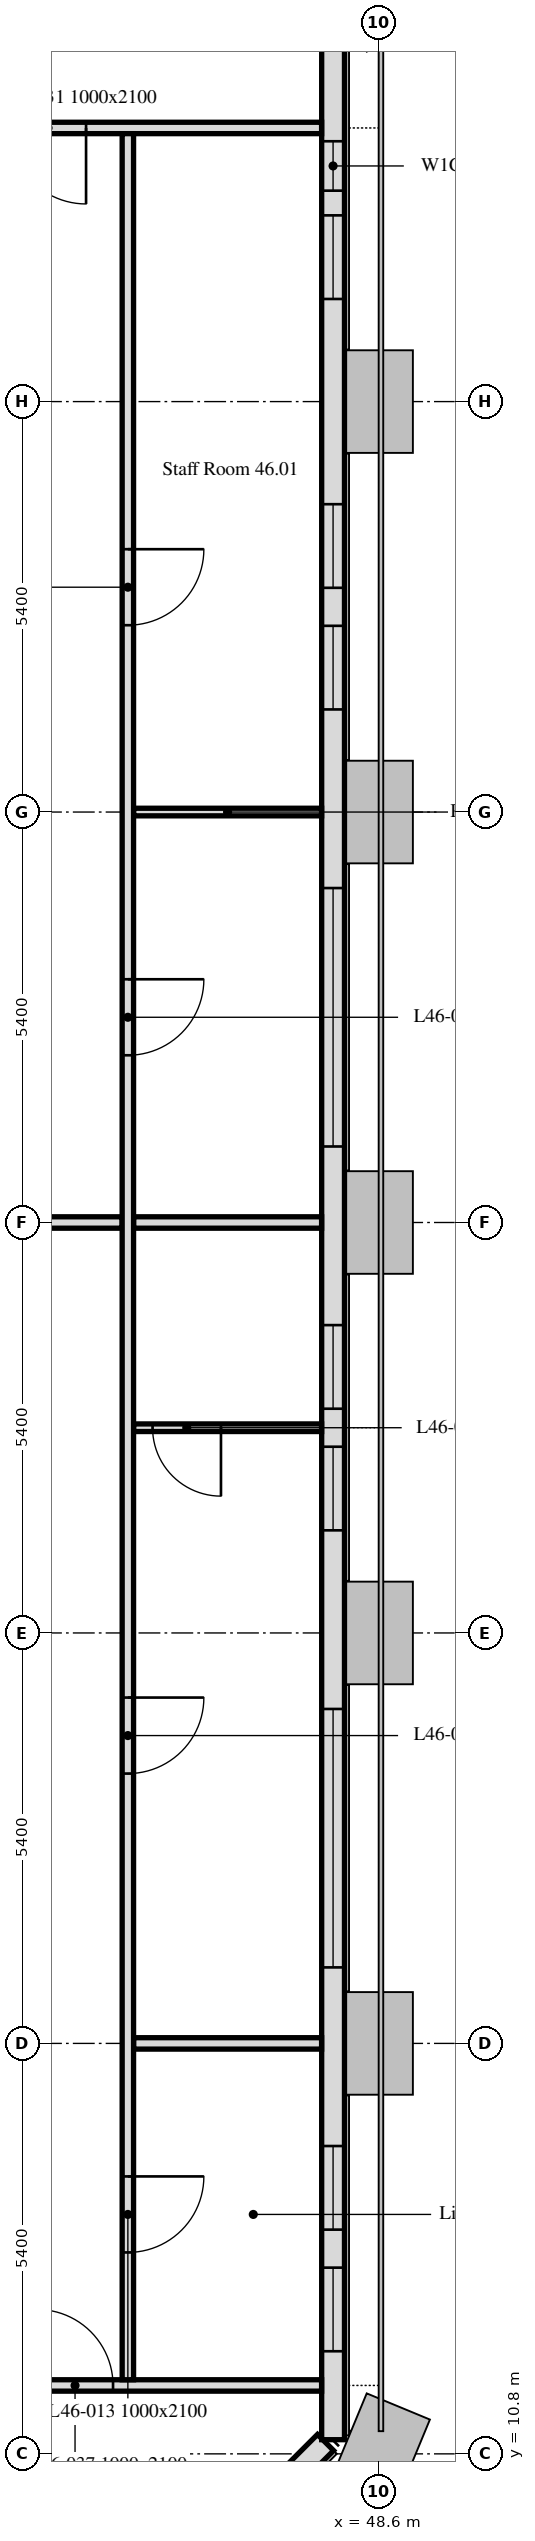
"""IFC4 building model, lengths in metres.
Left out: names, types, materials, properties, quantities, classifications, styles, units other than length and angle.
Written with IfcOpenShell. Run it as: python <this file> out.ifc"""

import sys

from ifc_helpers import new_model, si_unit, direction, frame, frame_2d, origin, place, context, subcontext, project, spatial, rectangle, extrude, element, fill, save


model = new_model("IFC4")
c1 = context("Model", 3, precision=1e-05, world=origin(), true_north=direction((0.0, 1.0)))
c2 = subcontext(c1, "Body", "Model", "MODEL_VIEW")
j1 = project(units=[si_unit("LENGTHUNIT", "METRE"), si_unit("PLANEANGLEUNIT", "RADIAN")], contexts=[c1])
p1 = place(None, origin())
s1 = spatial("IfcSite", under=j1, at=p1, CompositionType="ELEMENT")
p2 = place(p1, origin())
s2 = spatial("IfcBuilding", under=s1, at=p2, CompositionType="ELEMENT")
p3 = place(p2, frame((0.0, 0.0, 190.6)))
s3 = spatial("IfcBuildingStorey", under=s2, at=p3, CompositionType="ELEMENT", Elevation=190.6)
p4 = place(p3, frame((43.051, 6.099, 0.0), z_axis=(0.0, 0.0, 1.0), x_axis=(0.707106781187, 0.707106781187, 0.0)))
e1 = element("IfcWall", 1, at=p4, inside=s3, PredefinedType="SOLIDWALL", context=c2, shape_type="SweptSolid", body=[
    extrude(rectangle(XDim=6.86, YDim=0.3, at=frame_2d((3.43, 0.0))), origin(), (0.0, 0.0, 1.0), 3.0),
])
p5 = place(p4, frame((1.28, 0.0, 0.9)))
e2 = element("IfcOpeningElement", 2, at=p5, cuts=e1, PredefinedType="OPENING", context=c2, shape_type="SweptSolid", body=[
    extrude(rectangle(XDim=1.1, YDim=1.7, at=frame_2d((0.55, 0.85))), frame((0.0, 0.16, 0.0), z_axis=(0.0, -1.0, 0.0), x_axis=(1.0, 0.0, 0.0)), (0.0, 0.0, 1.0), 0.32),
])
p6 = place(p4, frame((4.48, 0.0, 0.9)))
e3 = element("IfcOpeningElement", 3, at=p6, cuts=e1, PredefinedType="OPENING", context=c2, shape_type="SweptSolid", body=[
    extrude(rectangle(XDim=1.1, YDim=1.7, at=frame_2d((0.55, 0.85))), frame((0.0, 0.16, 0.0), z_axis=(0.0, -1.0, 0.0), x_axis=(1.0, 0.0, 0.0)), (0.0, 0.0, 1.0), 0.32),
])
p7 = place(p3, frame((48.0, 10.986, 0.0), z_axis=(0.0, 0.0, 1.0), x_axis=(0.0, 1.0, 0.0)))
e4 = element("IfcWall", 4, at=p7, inside=s3, PredefinedType="SOLIDWALL", context=c2, shape_type="SweptSolid", body=[
    extrude(rectangle(XDim=32.027, YDim=0.3, at=frame_2d((16.014, 0.0))), origin(), (0.0, 0.0, 1.0), 3.0),
])
p8 = place(p7, frame((1.164, 0.0, 0.9)))
e5 = element("IfcOpeningElement", 5, at=p8, cuts=e4, PredefinedType="OPENING", context=c2, shape_type="SweptSolid", body=[
    extrude(rectangle(XDim=1.1, YDim=1.7, at=frame_2d((0.55, 0.85))), frame((0.0, 0.16, 0.0), z_axis=(0.0, -1.0, 0.0), x_axis=(1.0, 0.0, 0.0)), (0.0, 0.0, 1.0), 0.32),
])
p9 = place(p7, frame((2.764, 0.0, 0.9)))
e6 = element("IfcOpeningElement", 6, at=p9, cuts=e4, PredefinedType="OPENING", context=c2, shape_type="SweptSolid", body=[
    extrude(rectangle(XDim=1.1, YDim=1.7, at=frame_2d((0.55, 0.85))), frame((0.0, 0.16, 0.0), z_axis=(0.0, -1.0, 0.0), x_axis=(1.0, 0.0, 0.0)), (0.0, 0.0, 1.0), 0.32),
])
p10 = place(p7, frame((6.214, 0.0, 0.9)))
e7 = element("IfcOpeningElement", 7, at=p10, cuts=e4, PredefinedType="OPENING", context=c2, shape_type="SweptSolid", body=[
    extrude(rectangle(XDim=3.4, YDim=1.7, at=frame_2d((1.7, 0.85))), frame((0.0, 0.16, 0.0), z_axis=(0.0, -1.0, 0.0), x_axis=(1.0, 0.0, 0.0)), (0.0, 0.0, 1.0), 0.32),
])
p11 = place(p7, frame((11.964, 0.0, 0.9)))
e8 = element("IfcOpeningElement", 8, at=p11, cuts=e4, PredefinedType="OPENING", context=c2, shape_type="SweptSolid", body=[
    extrude(rectangle(XDim=1.1, YDim=1.7, at=frame_2d((0.55, 0.85))), frame((0.0, 0.16, 0.0), z_axis=(0.0, -1.0, 0.0), x_axis=(1.0, 0.0, 0.0)), (0.0, 0.0, 1.0), 0.32),
])
p12 = place(p7, frame((13.564, 0.0, 0.9)))
e9 = element("IfcOpeningElement", 9, at=p12, cuts=e4, PredefinedType="OPENING", context=c2, shape_type="SweptSolid", body=[
    extrude(rectangle(XDim=1.1, YDim=1.7, at=frame_2d((0.55, 0.85))), frame((0.0, 0.16, 0.0), z_axis=(0.0, -1.0, 0.0), x_axis=(1.0, 0.0, 0.0)), (0.0, 0.0, 1.0), 0.32),
])
p13 = place(p7, frame((17.014, 0.0, 0.9)))
e10 = element("IfcOpeningElement", 10, at=p13, cuts=e4, PredefinedType="OPENING", context=c2, shape_type="SweptSolid", body=[
    extrude(rectangle(XDim=3.4, YDim=1.7, at=frame_2d((1.7, 0.85))), frame((0.0, 0.16, 0.0), z_axis=(0.0, -1.0, 0.0), x_axis=(1.0, 0.0, 0.0)), (0.0, 0.0, 1.0), 0.32),
])
p14 = place(p7, frame((22.764, 0.0, 0.9)))
e11 = element("IfcOpeningElement", 11, at=p14, cuts=e4, PredefinedType="OPENING", context=c2, shape_type="SweptSolid", body=[
    extrude(rectangle(XDim=1.1, YDim=1.7, at=frame_2d((0.55, 0.85))), frame((0.0, 0.16, 0.0), z_axis=(0.0, -1.0, 0.0), x_axis=(1.0, 0.0, 0.0)), (0.0, 0.0, 1.0), 0.32),
])
p15 = place(p7, frame((24.364, 0.0, 0.9)))
e12 = element("IfcOpeningElement", 12, at=p15, cuts=e4, PredefinedType="OPENING", context=c2, shape_type="SweptSolid", body=[
    extrude(rectangle(XDim=1.1, YDim=1.7, at=frame_2d((0.55, 0.85))), frame((0.0, 0.16, 0.0), z_axis=(0.0, -1.0, 0.0), x_axis=(1.0, 0.0, 0.0)), (0.0, 0.0, 1.0), 0.32),
])
p16 = place(p7, frame((28.164, 0.0, 0.9)))
e13 = element("IfcOpeningElement", 13, at=p16, cuts=e4, PredefinedType="OPENING", context=c2, shape_type="SweptSolid", body=[
    extrude(rectangle(XDim=1.1, YDim=1.7, at=frame_2d((0.55, 0.85))), frame((0.0, 0.16, 0.0), z_axis=(0.0, -1.0, 0.0), x_axis=(1.0, 0.0, 0.0)), (0.0, 0.0, 1.0), 0.32),
])
p17 = place(p7, frame((29.589, 0.0, 0.9)))
e14 = element("IfcOpeningElement", 14, at=p17, cuts=e4, PredefinedType="OPENING", context=c2, shape_type="SweptSolid", body=[
    extrude(rectangle(XDim=0.65, YDim=1.7, at=frame_2d((0.325, 0.85))), frame((0.0, 0.16, 0.0), z_axis=(0.0, -1.0, 0.0), x_axis=(1.0, 0.0, 0.0)), (0.0, 0.0, 1.0), 0.32),
])
p18 = place(p3, frame((45.375, 32.4, 0.0), z_axis=(0.0, 0.0, 1.0), x_axis=(1.0, 0.0, 0.0)))
e15 = element("IfcWall", 15, at=p18, inside=s3, PredefinedType="PARTITIONING", context=c2, shape_type="SweptSolid", body=[
    extrude(rectangle(XDim=2.474, YDim=0.1, at=frame_2d((1.237, 0.0))), origin(), (0.0, 0.0, 1.0), 2.4),
])
p19 = place(p3, frame((47.849, 41.4, 0.0), z_axis=(0.0, 0.0, 1.0), x_axis=(-1.0, 0.0, 0.0)))
e16 = element("IfcWall", 16, at=p19, inside=s3, PredefinedType="PARTITIONING", context=c2, shape_type="SweptSolid", body=[
    extrude(rectangle(XDim=41.698, YDim=0.15, at=frame_2d((20.849, 0.0))), origin(), (0.0, 0.0, 1.0), 2.4),
])
p20 = place(p19, frame((39.249, 0.0, 0.0)))
e17 = element("IfcOpeningElement", 17, at=p20, cuts=e16, PredefinedType="OPENING", context=c2, shape_type="SweptSolid", body=[
    extrude(rectangle(XDim=1.0, YDim=2.1, at=frame_2d((0.5, 1.05))), frame((0.0, 0.075, 0.0), z_axis=(0.0, -1.0, 0.0), x_axis=(1.0, 0.0, 0.0)), (0.0, 0.0, 1.0), 0.15),
])
p21 = place(p19, frame((11.449, 0.0, 0.0)))
e18 = element("IfcOpeningElement", 18, at=p21, cuts=e16, PredefinedType="OPENING", context=c2, shape_type="SweptSolid", body=[
    extrude(rectangle(XDim=1.0, YDim=2.1, at=frame_2d((0.5, 1.05))), frame((0.0, 0.075, 0.0), z_axis=(0.0, -1.0, 0.0), x_axis=(1.0, 0.0, 0.0)), (0.0, 0.0, 1.0), 0.15),
])
p22 = place(p19, frame((3.099, 0.0, 0.0)))
e19 = element("IfcOpeningElement", 19, at=p22, cuts=e16, PredefinedType="OPENING", context=c2, shape_type="SweptSolid", body=[
    extrude(rectangle(XDim=1.0, YDim=2.1, at=frame_2d((0.5, 1.05))), frame((0.0, 0.075, 0.0), z_axis=(0.0, -1.0, 0.0), x_axis=(1.0, 0.0, 0.0)), (0.0, 0.0, 1.0), 0.15),
])
p23 = place(p19, frame((23.049, 0.0, 0.0)))
e20 = element("IfcOpeningElement", 20, at=p23, cuts=e16, PredefinedType="OPENING", context=c2, shape_type="SweptSolid", body=[
    extrude(rectangle(XDim=1.0, YDim=2.1, at=frame_2d((0.5, 1.05))), frame((0.0, 0.075, 0.0), z_axis=(0.0, -1.0, 0.0), x_axis=(1.0, 0.0, 0.0)), (0.0, 0.0, 1.0), 0.15),
])
p24 = place(p3, frame((45.375, 27.0, 0.0), z_axis=(0.0, 0.0, 1.0), x_axis=(1.0, 0.0, 0.0)))
e21 = element("IfcWall", 21, at=p24, inside=s3, PredefinedType="PARTITIONING", context=c2, shape_type="SweptSolid", body=[
    extrude(rectangle(XDim=2.474, YDim=0.15, at=frame_2d((1.237, 0.0))), origin(), (0.0, 0.0, 1.0), 2.4),
])
p25 = place(p3, frame((43.2, 27.0, 0.0), z_axis=(0.0, 0.0, 1.0), x_axis=(1.0, 0.0, 0.0)))
e22 = element("IfcWall", 22, at=p25, inside=s3, PredefinedType="PARTITIONING", context=c2, shape_type="SweptSolid", body=[
    extrude(rectangle(XDim=2.025, YDim=0.15, at=frame_2d((1.013, 0.0))), origin(), (0.0, 0.0, 1.0), 2.4),
])
p26 = place(p3, frame((47.849, 16.2, 0.0), z_axis=(0.0, 0.0, 1.0), x_axis=(-1.0, 0.0, 0.0)))
e23 = element("IfcWall", 23, at=p26, inside=s3, PredefinedType="PARTITIONING", context=c2, shape_type="SweptSolid", body=[
    extrude(rectangle(XDim=2.474, YDim=0.15, at=frame_2d((1.237, 0.0))), origin(), (0.0, 0.0, 1.0), 2.4),
])
p27 = place(p3, frame((6.151, 11.7, 0.0), z_axis=(0.0, 0.0, 1.0), x_axis=(1.0, 0.0, 0.0)))
e24 = element("IfcWall", 24, at=p27, inside=s3, PredefinedType="PARTITIONING", context=c2, shape_type="SweptSolid", body=[
    extrude(rectangle(XDim=41.698, YDim=0.15, at=frame_2d((20.849, 0.0))), origin(), (0.0, 0.0, 1.0), 3.0),
])
p28 = place(p27, frame((17.649, 0.0, 0.0)))
e25 = element("IfcOpeningElement", 25, at=p28, cuts=e24, PredefinedType="OPENING", context=c2, shape_type="SweptSolid", body=[
    extrude(rectangle(XDim=1.0, YDim=2.1, at=frame_2d((0.5, 1.05))), frame((0.0, 0.075, 0.0), z_axis=(0.0, -1.0, 0.0), x_axis=(1.0, 0.0, 0.0)), (0.0, 0.0, 1.0), 0.15),
])
p29 = place(p27, frame((1.449, 0.0, 0.0)))
e26 = element("IfcOpeningElement", 26, at=p29, cuts=e24, PredefinedType="OPENING", context=c2, shape_type="SweptSolid", body=[
    extrude(rectangle(XDim=1.0, YDim=2.1, at=frame_2d((0.5, 1.05))), frame((0.0, 0.075, 0.0), z_axis=(0.0, -1.0, 0.0), x_axis=(1.0, 0.0, 0.0)), (0.0, 0.0, 1.0), 0.15),
])
p30 = place(p27, frame((29.249, 0.0, 0.0)))
e27 = element("IfcOpeningElement", 27, at=p30, cuts=e24, PredefinedType="OPENING", context=c2, shape_type="SweptSolid", body=[
    extrude(rectangle(XDim=1.0, YDim=2.1, at=frame_2d((0.5, 1.05))), frame((0.0, 0.075, 0.0), z_axis=(0.0, -1.0, 0.0), x_axis=(1.0, 0.0, 0.0)), (0.0, 0.0, 1.0), 0.15),
])
p31 = place(p27, frame((37.954, 0.0, 0.0)))
e28 = element("IfcOpeningElement", 28, at=p31, cuts=e24, PredefinedType="OPENING", context=c2, shape_type="SweptSolid", body=[
    extrude(rectangle(XDim=1.0, YDim=2.1, at=frame_2d((0.5, 1.05))), frame((0.0, 0.075, 0.0), z_axis=(0.0, -1.0, 0.0), x_axis=(1.0, 0.0, 0.0)), (0.0, 0.0, 1.0), 0.15),
])
p32 = place(p3, frame((47.849, 24.3, 0.0), z_axis=(0.0, 0.0, 1.0), x_axis=(-1.0, 0.0, 0.0)))
e29 = element("IfcWall", 29, at=p32, inside=s3, PredefinedType="PARTITIONING", context=c2, shape_type="SweptSolid", body=[
    extrude(rectangle(XDim=2.474, YDim=0.1, at=frame_2d((1.237, 0.0))), origin(), (0.0, 0.0, 1.0), 3.0),
])
p33 = place(p32, frame((1.324, 0.0, 0.0)))
e30 = element("IfcOpeningElement", 30, at=p33, cuts=e29, PredefinedType="OPENING", context=c2, shape_type="SweptSolid", body=[
    extrude(rectangle(XDim=0.9, YDim=2.1, at=frame_2d((0.45, 1.05))), frame((0.0, 0.05, 0.0), z_axis=(0.0, -1.0, 0.0), x_axis=(1.0, 0.0, 0.0)), (0.0, 0.0, 1.0), 0.1),
])
p34 = place(p3, frame((45.3, 41.325, 0.0), z_axis=(0.0, 0.0, 1.0), x_axis=(0.0, -1.0, 0.0)))
e31 = element("IfcWall", 31, at=p34, inside=s3, PredefinedType="PARTITIONING", context=c2, shape_type="SweptSolid", body=[
    extrude(rectangle(XDim=29.55, YDim=0.15, at=frame_2d((14.775, 0.0))), origin(), (0.0, 0.0, 1.0), 2.4),
])
p35 = place(p34, frame((5.467, 0.0, 0.0)))
e32 = element("IfcOpeningElement", 32, at=p35, cuts=e31, PredefinedType="OPENING", context=c2, shape_type="SweptSolid", body=[
    extrude(rectangle(XDim=1.0, YDim=2.1, at=frame_2d((0.5, 1.05))), frame((0.0, 0.075, 0.0), z_axis=(0.0, -1.0, 0.0), x_axis=(1.0, 0.0, 0.0)), (0.0, 0.0, 1.0), 0.15),
])
p36 = place(p34, frame((11.125, 0.0, 0.0)))
e33 = element("IfcOpeningElement", 33, at=p36, cuts=e31, PredefinedType="OPENING", context=c2, shape_type="SweptSolid", body=[
    extrude(rectangle(XDim=1.0, YDim=2.1, at=frame_2d((0.5, 1.05))), frame((0.0, 0.075, 0.0), z_axis=(0.0, -1.0, 0.0), x_axis=(1.0, 0.0, 0.0)), (0.0, 0.0, 1.0), 0.15),
])
p37 = place(p34, frame((26.875, 0.0, 0.0)))
e34 = element("IfcOpeningElement", 34, at=p37, cuts=e31, PredefinedType="OPENING", context=c2, shape_type="SweptSolid", body=[
    extrude(rectangle(XDim=1.0, YDim=2.1, at=frame_2d((0.5, 1.05))), frame((0.0, 0.075, 0.0), z_axis=(0.0, -1.0, 0.0), x_axis=(1.0, 0.0, 0.0)), (0.0, 0.0, 1.0), 0.15),
])
p38 = place(p34, frame((20.575, 0.0, 0.0)))
e35 = element("IfcOpeningElement", 35, at=p38, cuts=e31, PredefinedType="OPENING", context=c2, shape_type="SweptSolid", body=[
    extrude(rectangle(XDim=1.0, YDim=2.1, at=frame_2d((0.5, 1.05))), frame((0.0, 0.075, 0.0), z_axis=(0.0, -1.0, 0.0), x_axis=(1.0, 0.0, 0.0)), (0.0, 0.0, 1.0), 0.15),
])
p39 = place(p8, origin())
e36 = element("IfcWindow", 36, at=p39, inside=s3, PartitioningType="SINGLE_PANEL", PredefinedType="WINDOW", context=c2, shape_type="SweptSolid", body=[
    extrude(rectangle(XDim=1.1, YDim=1.7, at=frame_2d((0.55, 0.85))), frame((0.0, 0.03, 0.0), z_axis=(0.0, -1.0, 0.0), x_axis=(1.0, 0.0, 0.0)), (0.0, 0.0, 1.0), 0.06),
])
fill(e5, e36)
p40 = place(p9, origin())
e37 = element("IfcWindow", 37, at=p40, inside=s3, PartitioningType="SINGLE_PANEL", PredefinedType="WINDOW", context=c2, shape_type="SweptSolid", body=[
    extrude(rectangle(XDim=1.1, YDim=1.7, at=frame_2d((0.55, 0.85))), frame((0.0, 0.03, 0.0), z_axis=(0.0, -1.0, 0.0), x_axis=(1.0, 0.0, 0.0)), (0.0, 0.0, 1.0), 0.06),
])
fill(e6, e37)
p41 = place(p10, origin())
e38 = element("IfcWindow", 38, at=p41, inside=s3, PartitioningType="SINGLE_PANEL", PredefinedType="WINDOW", context=c2, shape_type="SweptSolid", body=[
    extrude(rectangle(XDim=3.4, YDim=1.7, at=frame_2d((1.7, 0.85))), frame((0.0, 0.03, 0.0), z_axis=(0.0, -1.0, 0.0), x_axis=(1.0, 0.0, 0.0)), (0.0, 0.0, 1.0), 0.06),
])
fill(e7, e38)
p42 = place(p11, origin())
e39 = element("IfcWindow", 39, at=p42, inside=s3, PartitioningType="SINGLE_PANEL", PredefinedType="WINDOW", context=c2, shape_type="SweptSolid", body=[
    extrude(rectangle(XDim=1.1, YDim=1.7, at=frame_2d((0.55, 0.85))), frame((0.0, 0.03, 0.0), z_axis=(0.0, -1.0, 0.0), x_axis=(1.0, 0.0, 0.0)), (0.0, 0.0, 1.0), 0.06),
])
fill(e8, e39)
p43 = place(p12, origin())
e40 = element("IfcWindow", 40, at=p43, inside=s3, PartitioningType="SINGLE_PANEL", PredefinedType="WINDOW", context=c2, shape_type="SweptSolid", body=[
    extrude(rectangle(XDim=1.1, YDim=1.7, at=frame_2d((0.55, 0.85))), frame((0.0, 0.03, 0.0), z_axis=(0.0, -1.0, 0.0), x_axis=(1.0, 0.0, 0.0)), (0.0, 0.0, 1.0), 0.06),
])
fill(e9, e40)
p44 = place(p13, origin())
e41 = element("IfcWindow", 41, at=p44, inside=s3, PartitioningType="SINGLE_PANEL", PredefinedType="WINDOW", context=c2, shape_type="SweptSolid", body=[
    extrude(rectangle(XDim=3.4, YDim=1.7, at=frame_2d((1.7, 0.85))), frame((0.0, 0.03, 0.0), z_axis=(0.0, -1.0, 0.0), x_axis=(1.0, 0.0, 0.0)), (0.0, 0.0, 1.0), 0.06),
])
fill(e10, e41)
p45 = place(p14, origin())
e42 = element("IfcWindow", 42, at=p45, inside=s3, PartitioningType="SINGLE_PANEL", PredefinedType="WINDOW", context=c2, shape_type="SweptSolid", body=[
    extrude(rectangle(XDim=1.1, YDim=1.7, at=frame_2d((0.55, 0.85))), frame((0.0, 0.03, 0.0), z_axis=(0.0, -1.0, 0.0), x_axis=(1.0, 0.0, 0.0)), (0.0, 0.0, 1.0), 0.06),
])
fill(e11, e42)
p46 = place(p15, origin())
e43 = element("IfcWindow", 43, at=p46, inside=s3, PartitioningType="SINGLE_PANEL", PredefinedType="WINDOW", context=c2, shape_type="SweptSolid", body=[
    extrude(rectangle(XDim=1.1, YDim=1.7, at=frame_2d((0.55, 0.85))), frame((0.0, 0.03, 0.0), z_axis=(0.0, -1.0, 0.0), x_axis=(1.0, 0.0, 0.0)), (0.0, 0.0, 1.0), 0.06),
])
fill(e12, e43)
p47 = place(p16, origin())
e44 = element("IfcWindow", 44, at=p47, inside=s3, PartitioningType="SINGLE_PANEL", PredefinedType="WINDOW", context=c2, shape_type="SweptSolid", body=[
    extrude(rectangle(XDim=1.1, YDim=1.7, at=frame_2d((0.55, 0.85))), frame((0.0, 0.03, 0.0), z_axis=(0.0, -1.0, 0.0), x_axis=(1.0, 0.0, 0.0)), (0.0, 0.0, 1.0), 0.06),
])
fill(e13, e44)
p48 = place(p17, origin())
e45 = element("IfcWindow", 45, at=p48, inside=s3, PartitioningType="SINGLE_PANEL", PredefinedType="WINDOW", context=c2, shape_type="SweptSolid", body=[
    extrude(rectangle(XDim=0.65, YDim=1.7, at=frame_2d((0.325, 0.85))), frame((0.0, 0.03, 0.0), z_axis=(0.0, -1.0, 0.0), x_axis=(1.0, 0.0, 0.0)), (0.0, 0.0, 1.0), 0.06),
])
fill(e14, e45)
p49 = place(p35, origin())
e46 = element("IfcDoor", 46, at=p49, inside=s3, OperationType="SINGLE_SWING_LEFT", PredefinedType="DOOR", context=c2, shape_type="SweptSolid", body=[
    extrude(rectangle(XDim=1.0, YDim=2.1, at=frame_2d((0.5, 1.05))), frame((0.0, 0.025, 0.0), z_axis=(0.0, -1.0, 0.0), x_axis=(1.0, 0.0, 0.0)), (0.0, 0.0, 1.0), 0.05),
])
fill(e32, e46)
p50 = place(p36, origin())
e47 = element("IfcDoor", 47, at=p50, inside=s3, OperationType="SINGLE_SWING_RIGHT", PredefinedType="DOOR", context=c2, shape_type="SweptSolid", body=[
    extrude(rectangle(XDim=1.0, YDim=2.1, at=frame_2d((0.5, 1.05))), frame((0.0, 0.025, 0.0), z_axis=(0.0, -1.0, 0.0), x_axis=(1.0, 0.0, 0.0)), (0.0, 0.0, 1.0), 0.05),
])
fill(e33, e47)
p51 = place(p37, origin())
e48 = element("IfcDoor", 48, at=p51, inside=s3, OperationType="SINGLE_SWING_LEFT", PredefinedType="DOOR", context=c2, shape_type="SweptSolid", body=[
    extrude(rectangle(XDim=1.0, YDim=2.1, at=frame_2d((0.5, 1.05))), frame((0.0, 0.025, 0.0), z_axis=(0.0, -1.0, 0.0), x_axis=(1.0, 0.0, 0.0)), (0.0, 0.0, 1.0), 0.05),
])
fill(e34, e48)
p52 = place(p33, origin())
e49 = element("IfcDoor", 49, at=p52, inside=s3, OperationType="SINGLE_SWING_LEFT", PredefinedType="DOOR", context=c2, shape_type="SweptSolid", body=[
    extrude(rectangle(XDim=0.9, YDim=2.1, at=frame_2d((0.45, 1.05))), frame((0.0, 0.025, 0.0), z_axis=(0.0, -1.0, 0.0), x_axis=(1.0, 0.0, 0.0)), (0.0, 0.0, 1.0), 0.05),
])
fill(e30, e49)
p53 = place(p22, origin())
e50 = element("IfcDoor", 50, at=p53, inside=s3, OperationType="SINGLE_SWING_RIGHT", PredefinedType="DOOR", context=c2, shape_type="SweptSolid", body=[
    extrude(rectangle(XDim=1.0, YDim=2.1, at=frame_2d((0.5, 1.05))), frame((0.0, 0.025, 0.0), z_axis=(0.0, -1.0, 0.0), x_axis=(1.0, 0.0, 0.0)), (0.0, 0.0, 1.0), 0.05),
])
fill(e19, e50)
p54 = place(p31, origin())
e51 = element("IfcDoor", 51, at=p54, inside=s3, OperationType="SINGLE_SWING_RIGHT", PredefinedType="DOOR", context=c2, shape_type="SweptSolid", body=[
    extrude(rectangle(XDim=1.0, YDim=2.1, at=frame_2d((0.5, 1.05))), frame((0.0, 0.025, 0.0), z_axis=(0.0, -1.0, 0.0), x_axis=(1.0, 0.0, 0.0)), (0.0, 0.0, 1.0), 0.05),
])
fill(e28, e51)
p55 = place(p38, origin())
e52 = element("IfcDoor", 52, at=p55, inside=s3, OperationType="SINGLE_SWING_LEFT", PredefinedType="DOOR", context=c2, shape_type="SweptSolid", body=[
    extrude(rectangle(XDim=1.0, YDim=2.1, at=frame_2d((0.5, 1.05))), frame((0.0, 0.025, 0.0), z_axis=(0.0, -1.0, 0.0), x_axis=(1.0, 0.0, 0.0)), (0.0, 0.0, 1.0), 0.05),
])
fill(e35, e52)
save(model, sys.argv[1])
